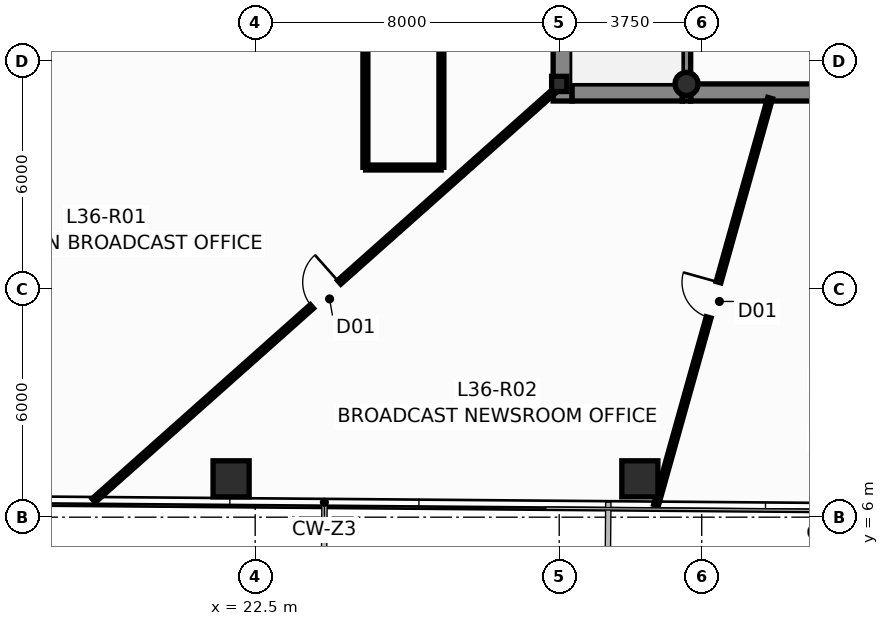
"""IFC4 building model, lengths in metres.
Left out: names, types, materials, properties, quantities, classifications, styles, units other than length and angle.
Written with IfcOpenShell. Run it as: python <this file> out.ifc"""

import sys

from ifc_helpers import new_model, si_unit, direction, frame, frame_2d, origin, origin_2d, place, context, subcontext, project, spatial, rectangle, hollow_rectangle, hollow_circle, i_section, extrude, source, transform, mapped, element, fill, save


model = new_model("IFC4")
c1 = context("Model", 3, precision=1e-05, world=origin(), true_north=direction((0.0, 1.0)))
c2 = subcontext(c1, "Body", "Model", "MODEL_VIEW")
j1 = project(units=[si_unit("LENGTHUNIT", "METRE"), si_unit("PLANEANGLEUNIT", "RADIAN")], contexts=[c1])
p1 = place(None, origin())
s1 = spatial("IfcSite", under=j1, at=p1, CompositionType="ELEMENT")
p2 = place(p1, origin())
s2 = spatial("IfcBuilding", under=s1, at=p2, CompositionType="ELEMENT")
p3 = place(p2, frame((0.0, 0.0, 139.1)))
s3 = spatial("IfcBuildingStorey", under=s2, at=p3, CompositionType="ELEMENT", Elevation=139.1)
m1 = source(origin(), c2, "Body", "SweptSolid", [
    extrude(i_section(OverallWidth=0.4, OverallDepth=0.4, WebThickness=0.02, FlangeThickness=0.032, at=origin_2d()), origin(), (0.0, 0.0, 1.0), 3.65),
])
p4 = place(p3, frame((30.5, 17.4, 0.0), z_axis=(0.0, 0.0, 1.0), x_axis=(1.0, 0.0, 0.0)))
e1 = element("IfcColumn", 1, at=p4, inside=s3, PredefinedType="COLUMN", context=c2, shape_type="MappedRepresentation", body=[
    mapped(m1, transform((0.0, 0.0, 0.0), scale=1.0)),
])
m2 = source(origin(), c2, "Body", "SweptSolid", [
    extrude(hollow_circle(Radius=0.305, WallThickness=0.025, at=origin_2d()), origin(), (0.0, 0.0, 1.0), 3.65),
])
p5 = place(p3, frame((33.85, 17.4, 0.0), z_axis=(0.0, 0.0, 1.0), x_axis=(1.0, 0.0, 0.0)))
e2 = element("IfcColumn", 2, at=p5, inside=s3, PredefinedType="COLUMN", context=c2, shape_type="MappedRepresentation", body=[
    mapped(m2, transform((0.0, 0.0, 0.0), scale=1.0)),
])
p6 = place(p3, frame((30.59, 16.95, 0.0), z_axis=(0.0, 0.0, 1.0), x_axis=(0.0, 1.0, 0.0)))
e3 = element("IfcWall", 3, at=p6, inside=s3, PredefinedType="SHEAR", context=c2, shape_type="SweptSolid", body=[
    extrude(rectangle(XDim=13.275, YDim=0.5, at=frame_2d((6.638, 0.0))), origin(), (0.0, 0.0, 1.0), 3.65),
])
p7 = place(p6, frame((6.4, 0.0, 0.0)))
e4 = element("IfcOpeningElement", 4, at=p7, cuts=e3, PredefinedType="OPENING", context=c2, shape_type="SweptSolid", body=[
    extrude(rectangle(XDim=1.12, YDim=2.15, at=frame_2d((0.56, 1.075))), frame((0.0, 0.262, 0.0), z_axis=(0.0, -1.0, 0.0), x_axis=(1.0, 0.0, 0.0)), (0.0, 0.0, 1.0), 0.524),
])
p8 = place(p6, frame((10.85, 0.0, 0.0)))
e5 = element("IfcOpeningElement", 5, at=p8, cuts=e3, PredefinedType="OPENING", context=c2, shape_type="SweptSolid", body=[
    extrude(rectangle(XDim=1.2, YDim=2.2, at=frame_2d((0.6, 1.1))), frame((0.0, 0.262, 0.0), z_axis=(0.0, -1.0, 0.0), x_axis=(1.0, 0.0, 0.0)), (0.0, 0.0, 1.0), 0.524),
])
p9 = place(p3, frame((30.84, 17.175, 0.0), z_axis=(0.0, 0.0, 1.0), x_axis=(1.0, 0.0, 0.0)))
e6 = element("IfcWall", 6, at=p9, inside=s3, PredefinedType="SHEAR", context=c2, shape_type="SweptSolid", body=[
    extrude(rectangle(XDim=2.9, YDim=0.45, at=frame_2d((1.45, 0.0))), origin(), (0.0, 0.0, 1.0), 3.65),
])
p10 = place(p3, frame((33.96, 17.175, 0.0), z_axis=(0.0, 0.0, 1.0), x_axis=(1.0, 0.0, 0.0)))
e7 = element("IfcWall", 7, at=p10, inside=s3, PredefinedType="SHEAR", context=c2, shape_type="SweptSolid", body=[
    extrude(rectangle(XDim=8.08, YDim=0.45, at=frame_2d((4.04, 0.0))), origin(), (0.0, 0.0, 1.0), 3.65),
])
p11 = place(p3, frame((33.85, 16.95, 0.0), z_axis=(0.0, 0.0, 1.0), x_axis=(0.0, 1.0, 0.0)))
e8 = element("IfcWall", 8, at=p11, inside=s3, PredefinedType="SHEAR", context=c2, shape_type="SweptSolid", body=[
    extrude(rectangle(XDim=13.275, YDim=0.22, at=frame_2d((6.638, 0.0))), origin(), (0.0, 0.0, 1.0), 3.65),
])
m3 = source(origin(), c2, "Body", "SweptSolid", [
    extrude(hollow_rectangle(XDim=0.95, YDim=0.95, WallThickness=0.05, at=origin_2d()), origin(), (0.0, 0.0, 1.0), 3.651),
])
p12 = place(p3, frame((21.866, 7.009, 0.0), z_axis=(-0.013440967269, 0.019793663242, 0.999713734673), x_axis=(-0.827290216258, -0.561774775229, 0.0)))
e9 = element("IfcColumn", 9, at=p12, inside=s3, PredefinedType="COLUMN", context=c2, shape_type="MappedRepresentation", body=[
    mapped(m3, transform((0.0, 0.0, 0.0), scale=1.0)),
])
m4 = source(origin(), c2, "Body", "SweptSolid", [
    extrude(hollow_rectangle(XDim=0.95, YDim=0.95, WallThickness=0.05, at=origin_2d()), origin(), (0.0, 0.0, 1.0), 3.651),
])
p13 = place(p3, frame((32.622, 7.009, 0.0), z_axis=(-0.004480682206, 0.019795252729, 0.999794014513), x_axis=(-0.975326687046, -0.220766513622, 0.0)))
e10 = element("IfcColumn", 10, at=p13, inside=s3, PredefinedType="COLUMN", context=c2, shape_type="MappedRepresentation", body=[
    mapped(m4, transform((0.0, 0.0, 0.0), scale=1.0)),
])
p14 = place(p3, frame((18.249, 6.437, 0.0), z_axis=(0.0, 0.0, 1.0), x_axis=(0.747352719188, 0.6644275078, 0.0)))
e11 = element("IfcWall", 11, at=p14, inside=s3, PredefinedType="PARTITIONING", context=c2, shape_type="SweptSolid", body=[
    extrude(rectangle(XDim=16.184, YDim=0.13, at=frame_2d((8.092, 0.0))), origin(), (0.0, 0.0, 1.0), 2.925),
])
p15 = place(p14, frame((7.685, 0.0, 0.0)))
e12 = element("IfcOpeningElement", 12, at=p15, cuts=e11, PredefinedType="OPENING", context=c2, shape_type="SweptSolid", body=[
    extrude(rectangle(XDim=0.96, YDim=2.15, at=frame_2d((0.48, 1.075))), frame((0.0, 0.077, 0.0), z_axis=(0.0, -1.0, 0.0), x_axis=(1.0, 0.0, 0.0)), (0.0, 0.0, 1.0), 0.154),
])
p16 = place(p3, frame((33.047, 6.316, 0.0), z_axis=(0.0, 0.0, 1.0), x_axis=(0.269944107311, 0.962875993536, 0.0)))
e13 = element("IfcWall", 13, at=p16, inside=s3, PredefinedType="PARTITIONING", context=c2, shape_type="SweptSolid", body=[
    extrude(rectangle(XDim=11.125, YDim=0.13, at=frame_2d((5.562, 0.0))), origin(), (0.0, 0.0, 1.0), 3.4),
])
p17 = place(p16, frame((5.132, 0.0, 0.0)))
e14 = element("IfcOpeningElement", 14, at=p17, cuts=e13, PredefinedType="OPENING", context=c2, shape_type="SweptSolid", body=[
    extrude(rectangle(XDim=0.96, YDim=2.15, at=frame_2d((0.48, 1.075))), frame((0.0, 0.077, 0.0), z_axis=(0.0, -1.0, 0.0), x_axis=(1.0, 0.0, 0.0)), (0.0, 0.0, 1.0), 0.154),
])
p18 = place(p3, frame((27.4, 15.205, 0.0), z_axis=(0.0, 0.0, 1.0), x_axis=(0.0, 1.0, 0.0)))
e15 = element("IfcWall", 15, at=p18, inside=s3, PredefinedType="PARTITIONING", context=c2, shape_type="SweptSolid", body=[
    extrude(rectangle(XDim=7.9, YDim=0.13, at=frame_2d((3.95, 0.0))), origin(), (0.0, 0.0, 1.0), 3.4),
])
p19 = place(p18, frame((3.47, 0.0, 0.0)))
e16 = element("IfcOpeningElement", 16, at=p19, cuts=e15, PredefinedType="OPENING", context=c2, shape_type="SweptSolid", body=[
    extrude(rectangle(XDim=0.96, YDim=2.15, at=frame_2d((0.48, 1.075))), frame((0.0, 0.077, 0.0), z_axis=(0.0, -1.0, 0.0), x_axis=(1.0, 0.0, 0.0)), (0.0, 0.0, 1.0), 0.154),
])
p20 = place(p3, frame((25.4, 21.225, 0.0), z_axis=(0.0, 0.0, 1.0), x_axis=(0.0, -1.0, 0.0)))
e17 = element("IfcWall", 17, at=p20, inside=s3, PredefinedType="PARTITIONING", context=c2, shape_type="SweptSolid", body=[
    extrude(rectangle(XDim=6.02, YDim=0.13, at=frame_2d((3.01, 0.0))), origin(), (0.0, 0.0, 1.0), 3.078),
])
p21 = place(p3, frame((25.405, 15.2, 0.0), z_axis=(0.0, 0.0, 1.0), x_axis=(1.0, 0.0, 0.0)))
e18 = element("IfcWall", 18, at=p21, inside=s3, PredefinedType="PARTITIONING", context=c2, shape_type="SweptSolid", body=[
    extrude(rectangle(XDim=1.99, YDim=0.13, at=frame_2d((0.995, 0.0))), origin(), (0.0, 0.0, 1.0), 3.4),
])
p22 = place(p15, origin())
e19 = element("IfcDoor", 19, at=p22, inside=s3, OperationType="SINGLE_SWING_RIGHT", PredefinedType="DOOR", context=c2, shape_type="SweptSolid", body=[
    extrude(rectangle(XDim=0.96, YDim=2.15, at=frame_2d((0.48, 1.075))), frame((0.0, 0.025, 0.0), z_axis=(0.0, -1.0, 0.0), x_axis=(1.0, 0.0, 0.0)), (0.0, 0.0, 1.0), 0.05),
])
fill(e12, e19)
p23 = place(p17, origin())
e20 = element("IfcDoor", 20, at=p23, inside=s3, OperationType="SINGLE_SWING_RIGHT", PredefinedType="DOOR", context=c2, shape_type="SweptSolid", body=[
    extrude(rectangle(XDim=0.96, YDim=2.15, at=frame_2d((0.48, 1.075))), frame((0.0, 0.025, 0.0), z_axis=(0.0, -1.0, 0.0), x_axis=(1.0, 0.0, 0.0)), (0.0, 0.0, 1.0), 0.05),
])
fill(e14, e20)
save(model, sys.argv[1])
